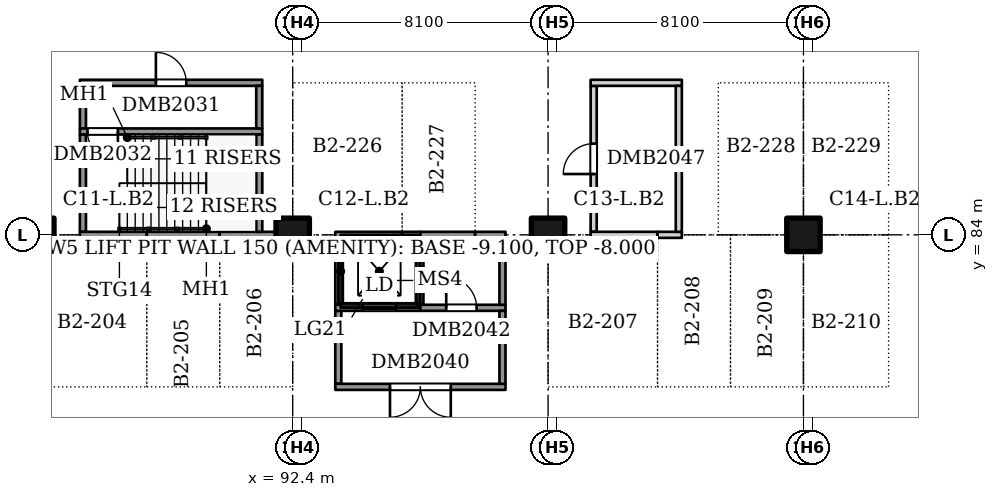
"""IFC4 building model, lengths in metres.
Left out: names, types, materials, properties, quantities, classifications, styles, units other than length and angle.
Written with IfcOpenShell. Run it as: python <this file> out.ifc"""

import sys

from ifc_helpers import new_model, si_unit, direction, frame, frame_2d, origin, origin_2d, place, context, subcontext, project, spatial, rectangle, extrude, element, fill, save


model = new_model("IFC4")
c1 = context("Model", 3, precision=1e-05, world=origin(), true_north=direction((0.0, 1.0)))
c2 = subcontext(c1, "Body", "Model", "MODEL_VIEW")
j1 = project(units=[si_unit("LENGTHUNIT", "METRE"), si_unit("PLANEANGLEUNIT", "RADIAN")], contexts=[c1])
p1 = place(None, origin())
s1 = spatial("IfcSite", under=j1, at=p1, CompositionType="ELEMENT")
p2 = place(p1, origin())
s2 = spatial("IfcBuilding", under=s1, at=p2, CompositionType="ELEMENT")
p3 = place(p2, frame((0.0, 0.0, -8.0)))
s3 = spatial("IfcBuildingStorey", under=s2, at=p3, CompositionType="ELEMENT", Elevation=-8.0)
for number, where, z_axis, x_axis in (
    (1, (84.0, 84.0, 0.0), (0.0, 0.0, 1.0), (1.0, 0.0, 0.0)),
    (2, (92.4, 84.0, 0.0), (0.0, 0.0, 1.0), (1.0, 0.0, 0.0)),
    (3, (100.8, 84.0, 0.0), (0.0, 0.0, 1.0), (1.0, 0.0, 0.0)),
    (4, (109.2, 84.0, 0.0), (0.0, 0.0, 1.0), (1.0, 0.0, 0.0)),
):
    element("IfcColumn", number, at=place(p3, frame(where, z_axis=z_axis, x_axis=x_axis)), inside=s3, PredefinedType="COLUMN", context=c2, shape_type="SweptSolid", body=[
        extrude(rectangle(XDim=1.1, YDim=1.1, at=origin_2d()), origin(), (0.0, 0.0, 1.0), 3.7),
    ])
p4 = place(p3, frame((85.5, 84.1, 0.0), z_axis=(0.0, 0.0, 1.0), x_axis=(0.0, 1.0, 0.0)))
e5 = element("IfcWall", 5, at=p4, inside=s3, PredefinedType="SOLIDWALL", context=c2, shape_type="SweptSolid", body=[
    extrude(rectangle(XDim=3.2, YDim=0.2, at=frame_2d((1.6, 0.0))), origin(), (0.0, 0.0, 1.0), 3.7),
])
p5 = place(p3, frame((85.4, 84.0, 0.0), z_axis=(0.0, 0.0, 1.0), x_axis=(1.0, 0.0, 0.0)))
e6 = element("IfcWall", 6, at=p5, inside=s3, PredefinedType="SOLIDWALL", context=c2, shape_type="SweptSolid", body=[
    extrude(rectangle(XDim=2.2, YDim=0.2, at=frame_2d((1.1, 0.0))), origin(), (0.0, 0.0, 1.0), 3.7),
])
p6 = place(p3, frame((85.5, 87.5, 0.0), z_axis=(0.0, 0.0, 1.0), x_axis=(0.0, 1.0, 0.0)))
e7 = element("IfcWall", 7, at=p6, inside=s3, PredefinedType="SOLIDWALL", context=c2, shape_type="SweptSolid", body=[
    extrude(rectangle(XDim=1.4, YDim=0.2, at=frame_2d((0.7, 0.0))), origin(), (0.0, 0.0, 1.0), 3.7),
])
p7 = place(p3, frame((85.4, 87.4, 0.0), z_axis=(0.0, 0.0, 1.0), x_axis=(1.0, 0.0, 0.0)))
e8 = element("IfcWall", 8, at=p7, inside=s3, PredefinedType="SOLIDWALL", context=c2, shape_type="SweptSolid", body=[
    extrude(rectangle(XDim=6.0, YDim=0.2, at=frame_2d((3.0, 0.0))), origin(), (0.0, 0.0, 1.0), 3.7),
])
p8 = place(p7, frame((0.25, 0.0, 0.0)))
e9 = element("IfcOpeningElement", 9, at=p8, cuts=e8, PredefinedType="OPENING", context=c2, shape_type="SweptSolid", body=[
    extrude(rectangle(XDim=1.0, YDim=2.1, at=frame_2d((0.5, 1.05))), frame((0.0, 0.11, 0.0), z_axis=(0.0, -1.0, 0.0), x_axis=(1.0, 0.0, 0.0)), (0.0, 0.0, 1.0), 0.22),
])
p9 = place(p3, frame((85.4, 89.0, 0.0), z_axis=(0.0, 0.0, 1.0), x_axis=(1.0, 0.0, 0.0)))
e10 = element("IfcWall", 10, at=p9, inside=s3, PredefinedType="SOLIDWALL", context=c2, shape_type="SweptSolid", body=[
    extrude(rectangle(XDim=6.0, YDim=0.2, at=frame_2d((3.0, 0.0))), origin(), (0.0, 0.0, 1.0), 3.7),
])
p10 = place(p9, frame((2.5, 0.0, 0.0)))
e11 = element("IfcOpeningElement", 11, at=p10, cuts=e10, PredefinedType="OPENING", context=c2, shape_type="SweptSolid", body=[
    extrude(rectangle(XDim=1.0, YDim=2.1, at=frame_2d((0.5, 1.05))), frame((0.0, 0.11, 0.0), z_axis=(0.0, -1.0, 0.0), x_axis=(1.0, 0.0, 0.0)), (0.0, 0.0, 1.0), 0.22),
])
p11 = place(p3, frame((87.6, 84.0, 0.0), z_axis=(0.0, 0.0, 1.0), x_axis=(1.0, 0.0, 0.0)))
e12 = element("IfcWall", 12, at=p11, inside=s3, PredefinedType="SOLIDWALL", context=c2, shape_type="SweptSolid", body=[
    extrude(rectangle(XDim=2.4, YDim=0.2, at=frame_2d((1.2, 0.0))), origin(), (0.0, 0.0, 1.0), 3.7),
])
p12 = place(p3, frame((90.0, 84.0, 0.0), z_axis=(0.0, 0.0, 1.0), x_axis=(1.0, 0.0, 0.0)))
e13 = element("IfcWall", 13, at=p12, inside=s3, PredefinedType="SOLIDWALL", context=c2, shape_type="SweptSolid", body=[
    extrude(rectangle(XDim=1.85, YDim=0.2, at=frame_2d((0.925, 0.0))), origin(), (0.0, 0.0, 1.0), 3.7),
])
p13 = place(p3, frame((91.3, 84.1, 0.0), z_axis=(0.0, 0.0, 1.0), x_axis=(0.0, 1.0, 0.0)))
e14 = element("IfcWall", 14, at=p13, inside=s3, PredefinedType="SOLIDWALL", context=c2, shape_type="SweptSolid", body=[
    extrude(rectangle(XDim=3.2, YDim=0.2, at=frame_2d((1.6, 0.0))), origin(), (0.0, 0.0, 1.0), 3.7),
])
p14 = place(p3, frame((91.3, 87.5, 0.0), z_axis=(0.0, 0.0, 1.0), x_axis=(0.0, 1.0, 0.0)))
e15 = element("IfcWall", 15, at=p14, inside=s3, PredefinedType="SOLIDWALL", context=c2, shape_type="SweptSolid", body=[
    extrude(rectangle(XDim=1.4, YDim=0.2, at=frame_2d((0.7, 0.0))), origin(), (0.0, 0.0, 1.0), 3.7),
])
p15 = place(p3, frame((93.9, 79.1, 0.0), z_axis=(0.0, 0.0, 1.0), x_axis=(0.0, 1.0, 0.0)))
e16 = element("IfcWall", 16, at=p15, inside=s3, PredefinedType="SOLIDWALL", context=c2, shape_type="SweptSolid", body=[
    extrude(rectangle(XDim=2.4, YDim=0.2, at=frame_2d((1.2, 0.0))), origin(), (0.0, 0.0, 1.0), 3.7),
])
p16 = place(p3, frame((93.8, 79.0, 0.0), z_axis=(0.0, 0.0, 1.0), x_axis=(1.0, 0.0, 0.0)))
e17 = element("IfcWall", 17, at=p16, inside=s3, PredefinedType="SOLIDWALL", context=c2, shape_type="SweptSolid", body=[
    extrude(rectangle(XDim=5.6, YDim=0.2, at=frame_2d((2.8, 0.0))), origin(), (0.0, 0.0, 1.0), 3.7),
])
p17 = place(p16, frame((1.8, 0.0, 0.0)))
e18 = element("IfcOpeningElement", 18, at=p17, cuts=e17, PredefinedType="OPENING", context=c2, shape_type="SweptSolid", body=[
    extrude(rectangle(XDim=2.0, YDim=2.1, at=frame_2d((1.0, 1.05))), frame((0.0, 0.11, 0.0), z_axis=(0.0, -1.0, 0.0), x_axis=(1.0, 0.0, 0.0)), (0.0, 0.0, 1.0), 0.22),
])
p18 = place(p3, frame((93.9, 81.7, 0.0), z_axis=(0.0, 0.0, 1.0), x_axis=(0.0, 1.0, 0.0)))
e19 = element("IfcWall", 19, at=p18, inside=s3, PredefinedType="SOLIDWALL", context=c2, shape_type="SweptSolid", body=[
    extrude(rectangle(XDim=2.2, YDim=0.2, at=frame_2d((1.1, 0.0))), origin(), (0.0, 0.0, 1.0), 3.7),
])
p19 = place(p3, frame((93.8, 81.6, 0.0), z_axis=(0.0, 0.0, 1.0), x_axis=(1.0, 0.0, 0.0)))
e20 = element("IfcWall", 20, at=p19, inside=s3, PredefinedType="SOLIDWALL", context=c2, shape_type="SweptSolid", body=[
    extrude(rectangle(XDim=2.8, YDim=0.2, at=frame_2d((1.4, 0.0))), origin(), (0.0, 0.0, 1.0), 3.7),
])
p20 = place(p19, frame((0.9, 0.0, 0.0)))
e21 = element("IfcOpeningElement", 21, at=p20, cuts=e20, PredefinedType="OPENING", context=c2, shape_type="SweptSolid", body=[
    extrude(rectangle(XDim=1.1, YDim=2.1, at=frame_2d((0.55, 1.05))), frame((0.0, 0.11, 0.0), z_axis=(0.0, -1.0, 0.0), x_axis=(1.0, 0.0, 0.0)), (0.0, 0.0, 1.0), 0.22),
])
p21 = place(p3, frame((93.8, 84.0, 0.0), z_axis=(0.0, 0.0, 1.0), x_axis=(1.0, 0.0, 0.0)))
e22 = element("IfcWall", 22, at=p21, inside=s3, PredefinedType="SOLIDWALL", context=c2, shape_type="SweptSolid", body=[
    extrude(rectangle(XDim=2.2, YDim=0.2, at=frame_2d((1.1, 0.0))), origin(), (0.0, 0.0, 1.0), 3.7),
])
p22 = place(p3, frame((96.0, 84.0, 0.0), z_axis=(0.0, 0.0, 1.0), x_axis=(1.0, 0.0, 0.0)))
e23 = element("IfcWall", 23, at=p22, inside=s3, PredefinedType="SOLIDWALL", context=c2, shape_type="SweptSolid", body=[
    extrude(rectangle(XDim=0.6, YDim=0.2, at=frame_2d((0.3, 0.0))), origin(), (0.0, 0.0, 1.0), 3.7),
])
p23 = place(p3, frame((96.6, 81.7, 0.0), z_axis=(0.0, 0.0, 1.0), x_axis=(0.0, 1.0, 0.0)))
e24 = element("IfcWall", 24, at=p23, inside=s3, PredefinedType="SOLIDWALL", context=c2, shape_type="SweptSolid", body=[
    extrude(rectangle(XDim=2.2, YDim=0.2, at=frame_2d((1.1, 0.0))), origin(), (0.0, 0.0, 1.0), 3.7),
])
p24 = place(p3, frame((96.6, 81.6, 0.0), z_axis=(0.0, 0.0, 1.0), x_axis=(1.0, 0.0, 0.0)))
e25 = element("IfcWall", 25, at=p24, inside=s3, PredefinedType="SOLIDWALL", context=c2, shape_type="SweptSolid", body=[
    extrude(rectangle(XDim=2.8, YDim=0.2, at=frame_2d((1.4, 0.0))), origin(), (0.0, 0.0, 1.0), 3.7),
])
p25 = place(p24, frame((0.85, 0.0, 0.0)))
e26 = element("IfcOpeningElement", 26, at=p25, cuts=e25, PredefinedType="OPENING", context=c2, shape_type="SweptSolid", body=[
    extrude(rectangle(XDim=1.0, YDim=2.1, at=frame_2d((0.5, 1.05))), frame((0.0, 0.11, 0.0), z_axis=(0.0, -1.0, 0.0), x_axis=(1.0, 0.0, 0.0)), (0.0, 0.0, 1.0), 0.22),
])
p26 = place(p3, frame((96.6, 84.0, 0.0), z_axis=(0.0, 0.0, 1.0), x_axis=(1.0, 0.0, 0.0)))
e27 = element("IfcWall", 27, at=p26, inside=s3, PredefinedType="SOLIDWALL", context=c2, shape_type="SweptSolid", body=[
    extrude(rectangle(XDim=1.8, YDim=0.2, at=frame_2d((0.9, 0.0))), origin(), (0.0, 0.0, 1.0), 3.7),
])
p27 = place(p3, frame((98.4, 84.0, 0.0), z_axis=(0.0, 0.0, 1.0), x_axis=(1.0, 0.0, 0.0)))
e28 = element("IfcWall", 28, at=p27, inside=s3, PredefinedType="SOLIDWALL", context=c2, shape_type="SweptSolid", body=[
    extrude(rectangle(XDim=1.0, YDim=0.2, at=frame_2d((0.5, 0.0))), origin(), (0.0, 0.0, 1.0), 3.7),
])
p28 = place(p3, frame((99.3, 79.1, 0.0), z_axis=(0.0, 0.0, 1.0), x_axis=(0.0, 1.0, 0.0)))
e29 = element("IfcWall", 29, at=p28, inside=s3, PredefinedType="SOLIDWALL", context=c2, shape_type="SweptSolid", body=[
    extrude(rectangle(XDim=2.4, YDim=0.2, at=frame_2d((1.2, 0.0))), origin(), (0.0, 0.0, 1.0), 3.7),
])
p29 = place(p3, frame((99.3, 81.7, 0.0), z_axis=(0.0, 0.0, 1.0), x_axis=(0.0, 1.0, 0.0)))
e30 = element("IfcWall", 30, at=p29, inside=s3, PredefinedType="SOLIDWALL", context=c2, shape_type="SweptSolid", body=[
    extrude(rectangle(XDim=2.2, YDim=0.2, at=frame_2d((1.1, 0.0))), origin(), (0.0, 0.0, 1.0), 3.7),
])
p30 = place(p3, frame((102.3, 84.1, 0.0), z_axis=(0.0, 0.0, 1.0), x_axis=(0.0, 1.0, 0.0)))
e31 = element("IfcWall", 31, at=p30, inside=s3, PredefinedType="PARTITIONING", context=c2, shape_type="SweptSolid", body=[
    extrude(rectangle(XDim=4.8, YDim=0.2, at=frame_2d((2.4, 0.0))), origin(), (0.0, 0.0, 1.0), 3.7),
])
p31 = place(p30, frame((1.9, 0.0, 0.0)))
e32 = element("IfcOpeningElement", 32, at=p31, cuts=e31, PredefinedType="OPENING", context=c2, shape_type="SweptSolid", body=[
    extrude(rectangle(XDim=1.0, YDim=2.1, at=frame_2d((0.5, 1.05))), frame((0.0, 0.11, 0.0), z_axis=(0.0, -1.0, 0.0), x_axis=(1.0, 0.0, 0.0)), (0.0, 0.0, 1.0), 0.22),
])
p32 = place(p3, frame((102.2, 84.0, 0.0), z_axis=(0.0, 0.0, 1.0), x_axis=(1.0, 0.0, 0.0)))
e33 = element("IfcWall", 33, at=p32, inside=s3, PredefinedType="PARTITIONING", context=c2, shape_type="SweptSolid", body=[
    extrude(rectangle(XDim=2.2, YDim=0.2, at=frame_2d((1.1, 0.0))), origin(), (0.0, 0.0, 1.0), 3.7),
])
p33 = place(p3, frame((102.2, 89.0, 0.0), z_axis=(0.0, 0.0, 1.0), x_axis=(1.0, 0.0, 0.0)))
e34 = element("IfcWall", 34, at=p33, inside=s3, PredefinedType="PARTITIONING", context=c2, shape_type="SweptSolid", body=[
    extrude(rectangle(XDim=3.0, YDim=0.2, at=frame_2d((1.5, 0.0))), origin(), (0.0, 0.0, 1.0), 3.7),
])
p34 = place(p3, frame((104.4, 84.0, 0.0), z_axis=(0.0, 0.0, 1.0), x_axis=(1.0, 0.0, 0.0)))
e35 = element("IfcWall", 35, at=p34, inside=s3, PredefinedType="PARTITIONING", context=c2, shape_type="SweptSolid", body=[
    extrude(rectangle(XDim=0.8, YDim=0.2, at=frame_2d((0.4, 0.0))), origin(), (0.0, 0.0, 1.0), 3.7),
])
p35 = place(p3, frame((105.1, 84.1, 0.0), z_axis=(0.0, 0.0, 1.0), x_axis=(0.0, 1.0, 0.0)))
e36 = element("IfcWall", 36, at=p35, inside=s3, PredefinedType="PARTITIONING", context=c2, shape_type="SweptSolid", body=[
    extrude(rectangle(XDim=4.8, YDim=0.2, at=frame_2d((2.4, 0.0))), origin(), (0.0, 0.0, 1.0), 3.7),
])
for number, where, z_axis, x_axis in (
    (37, (93.975, 81.675, -1.1), (0.0, 0.0, 1.0), (1.0, 0.0, 0.0)),
    (38, (93.975, 83.925, -1.1), (0.0, 0.0, 1.0), (1.0, 0.0, 0.0)),
):
    element("IfcWall", number, at=place(p3, frame(where, z_axis=z_axis, x_axis=x_axis)), inside=s3, PredefinedType="SOLIDWALL", context=c2, shape_type="SweptSolid", body=[
        extrude(rectangle(XDim=2.55, YDim=0.15, at=frame_2d((1.275, 0.0))), origin(), (0.0, 0.0, 1.0), 1.1),
    ])
for number, where, z_axis, x_axis in (
    (39, (93.975, 81.75, -1.1), (0.0, 0.0, 1.0), (0.0, 1.0, 0.0)),
    (40, (96.525, 81.75, -1.1), (0.0, 0.0, 1.0), (0.0, 1.0, 0.0)),
):
    element("IfcWall", number, at=place(p3, frame(where, z_axis=z_axis, x_axis=x_axis)), inside=s3, PredefinedType="SOLIDWALL", context=c2, shape_type="SweptSolid", body=[
        extrude(rectangle(XDim=2.1, YDim=0.15, at=frame_2d((1.05, 0.0))), origin(), (0.0, 0.0, 1.0), 1.1),
    ])
p36 = place(p10, origin())
e41 = element("IfcDoor", 41, at=p36, inside=s3, OperationType="SINGLE_SWING_LEFT", PredefinedType="DOOR", context=c2, shape_type="SweptSolid", body=[
    extrude(rectangle(XDim=1.0, YDim=2.1, at=frame_2d((0.5, 1.05))), frame((0.0, 0.025, 0.0), z_axis=(0.0, -1.0, 0.0), x_axis=(1.0, 0.0, 0.0)), (0.0, 0.0, 1.0), 0.05),
])
fill(e11, e41)
p37 = place(p8, frame((1.0, 0.0, 0.0), z_axis=(0.0, 0.0, 1.0), x_axis=(-1.0, 0.0, 0.0)))
e42 = element("IfcDoor", 42, at=p37, inside=s3, OperationType="SINGLE_SWING_LEFT", PredefinedType="DOOR", context=c2, shape_type="SweptSolid", body=[
    extrude(rectangle(XDim=1.0, YDim=2.1, at=frame_2d((0.5, 1.05))), frame((0.0, 0.025, 0.0), z_axis=(0.0, -1.0, 0.0), x_axis=(1.0, 0.0, 0.0)), (0.0, 0.0, 1.0), 0.05),
])
fill(e9, e42)
p38 = place(p17, frame((2.0, 0.0, 0.0), z_axis=(0.0, 0.0, 1.0), x_axis=(-1.0, 0.0, 0.0)))
e43 = element("IfcDoor", 43, at=p38, inside=s3, OperationType="DOUBLE_DOOR_SINGLE_SWING", PredefinedType="DOOR", context=c2, shape_type="SweptSolid", body=[
    extrude(rectangle(XDim=2.0, YDim=2.1, at=frame_2d((1.0, 1.05))), frame((0.0, 0.025, 0.0), z_axis=(0.0, -1.0, 0.0), x_axis=(1.0, 0.0, 0.0)), (0.0, 0.0, 1.0), 0.05),
])
fill(e18, e43)
p39 = place(p20, origin())
e44 = element("IfcDoor", 44, at=p39, inside=s3, OperationType="SLIDING_TO_LEFT", PredefinedType="DOOR", context=c2, shape_type="SweptSolid", body=[
    extrude(rectangle(XDim=1.1, YDim=2.1, at=frame_2d((0.55, 1.05))), frame((0.0, 0.025, 0.0), z_axis=(0.0, -1.0, 0.0), x_axis=(1.0, 0.0, 0.0)), (0.0, 0.0, 1.0), 0.05),
])
fill(e21, e44)
p40 = place(p25, origin())
e45 = element("IfcDoor", 45, at=p40, inside=s3, OperationType="SINGLE_SWING_LEFT", PredefinedType="DOOR", context=c2, shape_type="SweptSolid", body=[
    extrude(rectangle(XDim=1.0, YDim=2.1, at=frame_2d((0.5, 1.05))), frame((0.0, 0.025, 0.0), z_axis=(0.0, -1.0, 0.0), x_axis=(1.0, 0.0, 0.0)), (0.0, 0.0, 1.0), 0.05),
])
fill(e26, e45)
p41 = place(p31, origin())
e46 = element("IfcDoor", 46, at=p41, inside=s3, OperationType="SINGLE_SWING_LEFT", PredefinedType="DOOR", context=c2, shape_type="SweptSolid", body=[
    extrude(rectangle(XDim=1.0, YDim=2.1, at=frame_2d((0.5, 1.05))), frame((0.0, 0.025, 0.0), z_axis=(0.0, -1.0, 0.0), x_axis=(1.0, 0.0, 0.0)), (0.0, 0.0, 1.0), 0.05),
])
fill(e32, e46)
save(model, sys.argv[1])
